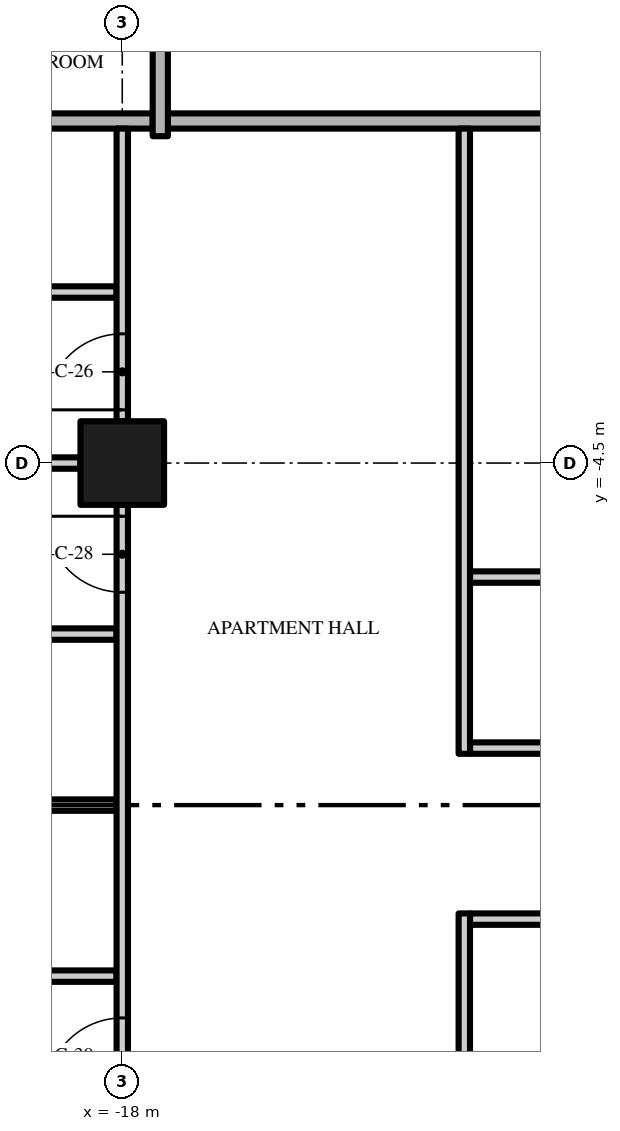
"""IFC4 building model, lengths in metres.
Left out: names, types, materials, properties, quantities, classifications, styles, units other than length and angle.
Written with IfcOpenShell. Run it as: python <this file> out.ifc"""

import sys

from ifc_helpers import new_model, si_unit, direction, frame, frame_2d, origin, origin_2d, place, context, subcontext, project, spatial, rectangle, extrude, element, fill, save


model = new_model("IFC4")
c1 = context("Model", 3, precision=1e-05, world=origin(), true_north=direction((0.0, 1.0)))
c2 = subcontext(c1, "Body", "Model", "MODEL_VIEW")
j1 = project(units=[si_unit("LENGTHUNIT", "METRE"), si_unit("PLANEANGLEUNIT", "RADIAN")], contexts=[c1])
p1 = place(None, origin())
s1 = spatial("IfcSite", under=j1, at=p1, CompositionType="ELEMENT")
p2 = place(p1, origin())
s2 = spatial("IfcBuilding", under=s1, at=p2, CompositionType="ELEMENT")
p3 = place(p2, frame((0.0, 0.0, 211.0)))
s3 = spatial("IfcBuildingStorey", under=s2, at=p3, CompositionType="ELEMENT", Elevation=211.0)
p4 = place(p3, frame((-18.0, -4.5, 0.0), z_axis=(0.0, 0.0, 1.0), x_axis=(1.0, 0.0, 0.0)))
e1 = element("IfcColumn", 1, at=p4, inside=s3, PredefinedType="COLUMN", context=c2, shape_type="SweptSolid", body=[
    extrude(rectangle(XDim=1.1, YDim=1.1, at=origin_2d()), origin(), (0.0, 0.0, 1.0), 3.5),
])
p5 = place(p3, frame((-20.925, -11.25, 0.0), z_axis=(0.0, 0.0, 1.0), x_axis=(1.0, 0.0, 0.0)))
e2 = element("IfcWall", 2, at=p5, inside=s3, PredefinedType="PARTITIONING", context=c2, shape_type="SweptSolid", body=[
    extrude(rectangle(XDim=2.85, YDim=0.15, at=frame_2d((1.425, 0.0))), origin(), (0.0, 0.0, 1.0), 3.5),
])
p6 = place(p3, frame((-13.425, -10.5, 0.0), z_axis=(0.0, 0.0, 1.0), x_axis=(1.0, 0.0, 0.0)))
e3 = element("IfcWall", 3, at=p6, inside=s3, PredefinedType="PARTITIONING", context=c2, shape_type="SweptSolid", body=[
    extrude(rectangle(XDim=4.35, YDim=0.15, at=frame_2d((2.175, 0.0))), origin(), (0.0, 0.0, 1.0), 3.5),
])
p7 = place(p3, frame((-20.925, -9.0, 0.0), z_axis=(0.0, 0.0, 1.0), x_axis=(1.0, 0.0, 0.0)))
e4 = element("IfcWall", 4, at=p7, inside=s3, PredefinedType="PARTITIONING", context=c2, shape_type="SweptSolid", body=[
    extrude(rectangle(XDim=2.85, YDim=0.15, at=frame_2d((1.425, 0.0))), origin(), (0.0, 0.0, 1.0), 3.5),
])
p8 = place(p3, frame((-13.425, -8.25, 0.0), z_axis=(0.0, 0.0, 1.0), x_axis=(1.0, 0.0, 0.0)))
e5 = element("IfcWall", 5, at=p8, inside=s3, PredefinedType="PARTITIONING", context=c2, shape_type="SweptSolid", body=[
    extrude(rectangle(XDim=4.35, YDim=0.15, at=frame_2d((2.175, 0.0))), origin(), (0.0, 0.0, 1.0), 3.5),
])
p9 = place(p8, frame((1.75, 0.0, 0.0)))
e6 = element("IfcOpeningElement", 6, at=p9, cuts=e5, PredefinedType="OPENING", context=c2, shape_type="SweptSolid", body=[
    extrude(rectangle(XDim=0.9, YDim=2.1, at=frame_2d((0.45, 1.05))), frame((0.0, 0.085, 0.0), z_axis=(0.0, -1.0, 0.0), x_axis=(1.0, 0.0, 0.0)), (0.0, 0.0, 1.0), 0.17),
])
p10 = place(p3, frame((-20.925, -6.75, 0.0), z_axis=(0.0, 0.0, 1.0), x_axis=(1.0, 0.0, 0.0)))
e7 = element("IfcWall", 7, at=p10, inside=s3, PredefinedType="PARTITIONING", context=c2, shape_type="SweptSolid", body=[
    extrude(rectangle(XDim=2.85, YDim=0.15, at=frame_2d((1.425, 0.0))), origin(), (0.0, 0.0, 1.0), 3.5),
])
p11 = place(p3, frame((-13.425, -6.0, 0.0), z_axis=(0.0, 0.0, 1.0), x_axis=(1.0, 0.0, 0.0)))
e8 = element("IfcWall", 8, at=p11, inside=s3, PredefinedType="PARTITIONING", context=c2, shape_type="SweptSolid", body=[
    extrude(rectangle(XDim=4.35, YDim=0.15, at=frame_2d((2.175, 0.0))), origin(), (0.0, 0.0, 1.0), 3.5),
])
p12 = place(p3, frame((-26.0, -4.5, 0.0), z_axis=(0.0, 0.0, 1.0), x_axis=(1.0, 0.0, 0.0)))
e9 = element("IfcWall", 9, at=p12, inside=s3, PredefinedType="PARTITIONING", context=c2, shape_type="SweptSolid", body=[
    extrude(rectangle(XDim=7.45, YDim=0.15, at=frame_2d((3.725, 0.0))), origin(), (0.0, 0.0, 1.0), 3.5),
])
p13 = place(p3, frame((-20.925, -2.25, 0.0), z_axis=(0.0, 0.0, 1.0), x_axis=(1.0, 0.0, 0.0)))
e10 = element("IfcWall", 10, at=p13, inside=s3, PredefinedType="PARTITIONING", context=c2, shape_type="SweptSolid", body=[
    extrude(rectangle(XDim=2.85, YDim=0.15, at=frame_2d((1.425, 0.0))), origin(), (0.0, 0.0, 1.0), 3.5),
])
p14 = place(p3, frame((-17.4, 0.0, 0.0), z_axis=(0.0, 0.0, 1.0), x_axis=(1.0, 0.0, 0.0)))
e11 = element("IfcWall", 11, at=p14, inside=s3, PredefinedType="PARTITIONING", context=c2, shape_type="SweptSolid", body=[
    extrude(rectangle(XDim=12.8, YDim=0.2, at=frame_2d((6.4, 0.0))), origin(), (0.0, 0.0, 1.0), 3.5),
])
p15 = place(p3, frame((-26.7, 0.0, 0.0), z_axis=(0.0, 0.0, 1.0), x_axis=(1.0, 0.0, 0.0)))
e12 = element("IfcWall", 12, at=p15, inside=s3, PredefinedType="PARTITIONING", context=c2, shape_type="SweptSolid", body=[
    extrude(rectangle(XDim=9.1, YDim=0.2, at=frame_2d((4.55, 0.0))), origin(), (0.0, 0.0, 1.0), 3.5),
])
p16 = place(p3, frame((-18.0, -12.95, 0.0), z_axis=(0.0, 0.0, 1.0), x_axis=(0.0, 1.0, 0.0)))
e13 = element("IfcWall", 13, at=p16, inside=s3, PredefinedType="PARTITIONING", context=c2, shape_type="SweptSolid", body=[
    extrude(rectangle(XDim=7.9, YDim=0.15, at=frame_2d((3.95, 0.0))), origin(), (0.0, 0.0, 1.0), 3.5),
])
p17 = place(p16, frame((6.75, 0.0, 0.0)))
e14 = element("IfcOpeningElement", 14, at=p17, cuts=e13, PredefinedType="OPENING", context=c2, shape_type="SweptSolid", body=[
    extrude(rectangle(XDim=1.0, YDim=2.4, at=frame_2d((0.5, 1.2))), frame((0.0, 0.085, 0.0), z_axis=(0.0, -1.0, 0.0), x_axis=(1.0, 0.0, 0.0)), (0.0, 0.0, 1.0), 0.17),
])
p18 = place(p16, frame((0.15, 0.0, 0.0)))
e15 = element("IfcOpeningElement", 15, at=p18, cuts=e13, PredefinedType="OPENING", context=c2, shape_type="SweptSolid", body=[
    extrude(rectangle(XDim=1.0, YDim=2.4, at=frame_2d((0.5, 1.2))), frame((0.0, 0.085, 0.0), z_axis=(0.0, -1.0, 0.0), x_axis=(1.0, 0.0, 0.0)), (0.0, 0.0, 1.0), 0.17),
])
p19 = place(p3, frame((-18.0, -3.95, 0.0), z_axis=(0.0, 0.0, 1.0), x_axis=(0.0, 1.0, 0.0)))
e16 = element("IfcWall", 16, at=p19, inside=s3, PredefinedType="PARTITIONING", context=c2, shape_type="SweptSolid", body=[
    extrude(rectangle(XDim=3.85, YDim=0.15, at=frame_2d((1.925, 0.0))), origin(), (0.0, 0.0, 1.0), 3.5),
])
p20 = place(p19, frame((0.15, 0.0, 0.0)))
e17 = element("IfcOpeningElement", 17, at=p20, cuts=e16, PredefinedType="OPENING", context=c2, shape_type="SweptSolid", body=[
    extrude(rectangle(XDim=1.0, YDim=2.4, at=frame_2d((0.5, 1.2))), frame((0.0, 0.085, 0.0), z_axis=(0.0, -1.0, 0.0), x_axis=(1.0, 0.0, 0.0)), (0.0, 0.0, 1.0), 0.17),
])
p21 = place(p3, frame((-17.5, -0.2, 0.0), z_axis=(0.0, 0.0, 1.0), x_axis=(0.0, 1.0, 0.0)))
e18 = element("IfcWall", 18, at=p21, inside=s3, PredefinedType="PARTITIONING", context=c2, shape_type="SweptSolid", body=[
    extrude(rectangle(XDim=4.15, YDim=0.2, at=frame_2d((2.075, 0.0))), origin(), (0.0, 0.0, 1.0), 3.5),
])
p22 = place(p3, frame((-13.5, -10.425, 0.0), z_axis=(0.0, 0.0, 1.0), x_axis=(0.0, -1.0, 0.0)))
e19 = element("IfcWall", 19, at=p22, inside=s3, PredefinedType="PARTITIONING", context=c2, shape_type="SweptSolid", body=[
    extrude(rectangle(XDim=11.775, YDim=0.15, at=frame_2d((5.888, 0.0))), origin(), (0.0, 0.0, 1.0), 3.5),
])
p23 = place(p22, frame((10.825, 0.0, 0.0)))
e20 = element("IfcOpeningElement", 20, at=p23, cuts=e19, PredefinedType="OPENING", context=c2, shape_type="SweptSolid", body=[
    extrude(rectangle(XDim=0.8, YDim=2.0, at=frame_2d((0.4, 1.0))), frame((0.0, 0.085, 0.0), z_axis=(0.0, -1.0, 0.0), x_axis=(1.0, 0.0, 0.0)), (0.0, 0.0, 1.0), 0.17),
])
p24 = place(p3, frame((-13.5, -8.325, 0.0), z_axis=(0.0, 0.0, 1.0), x_axis=(0.0, 1.0, 0.0)))
e21 = element("IfcWall", 21, at=p24, inside=s3, PredefinedType="PARTITIONING", context=c2, shape_type="SweptSolid", body=[
    extrude(rectangle(XDim=8.225, YDim=0.15, at=frame_2d((4.112, 0.0))), origin(), (0.0, 0.0, 1.0), 3.5),
])
p25 = place(p20, origin())
e22 = element("IfcDoor", 22, at=p25, inside=s3, OperationType="SINGLE_SWING_LEFT", PredefinedType="DOOR", context=c2, shape_type="SweptSolid", body=[
    extrude(rectangle(XDim=1.0, YDim=2.4, at=frame_2d((0.5, 1.2))), frame((0.0, 0.025, 0.0), z_axis=(0.0, -1.0, 0.0), x_axis=(1.0, 0.0, 0.0)), (0.0, 0.0, 1.0), 0.05),
])
fill(e17, e22)
p26 = place(p17, origin())
e23 = element("IfcDoor", 23, at=p26, inside=s3, OperationType="SINGLE_SWING_RIGHT", PredefinedType="DOOR", context=c2, shape_type="SweptSolid", body=[
    extrude(rectangle(XDim=1.0, YDim=2.4, at=frame_2d((0.5, 1.2))), frame((0.0, 0.025, 0.0), z_axis=(0.0, -1.0, 0.0), x_axis=(1.0, 0.0, 0.0)), (0.0, 0.0, 1.0), 0.05),
])
fill(e14, e23)
p27 = place(p18, origin())
e24 = element("IfcDoor", 24, at=p27, inside=s3, OperationType="SINGLE_SWING_LEFT", PredefinedType="DOOR", context=c2, shape_type="SweptSolid", body=[
    extrude(rectangle(XDim=1.0, YDim=2.4, at=frame_2d((0.5, 1.2))), frame((0.0, 0.025, 0.0), z_axis=(0.0, -1.0, 0.0), x_axis=(1.0, 0.0, 0.0)), (0.0, 0.0, 1.0), 0.05),
])
fill(e15, e24)
save(model, sys.argv[1])
